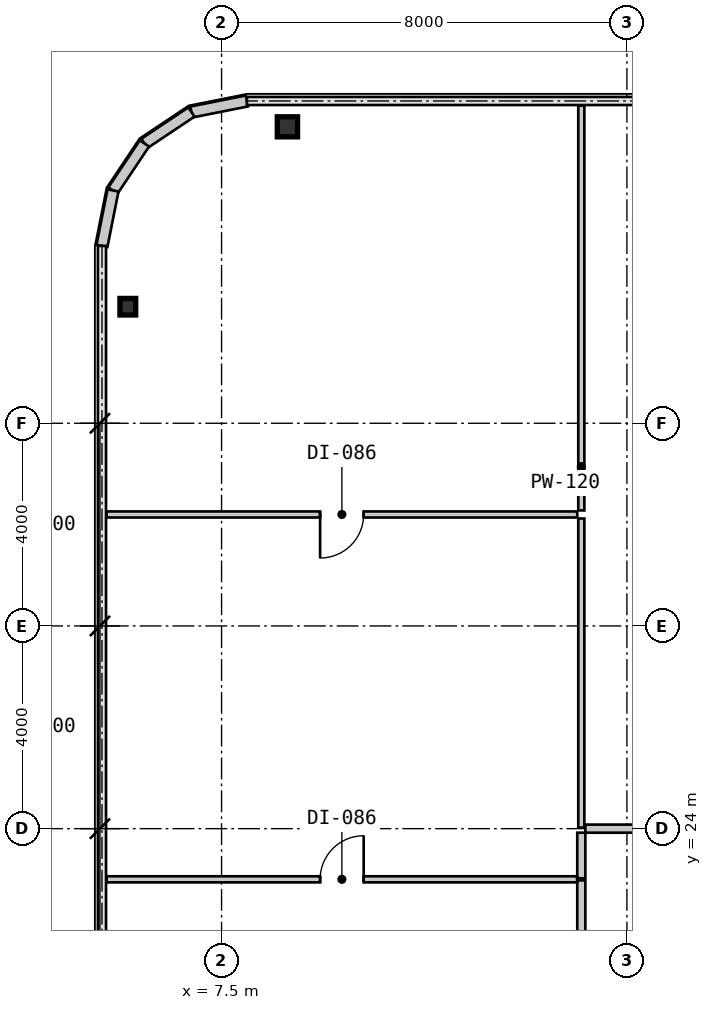
"""IFC4 building model, lengths in metres.
Left out: names, types, materials, properties, quantities, classifications, styles, units other than length and angle.
Written with IfcOpenShell. Run it as: python <this file> out.ifc"""

import sys

from ifc_helpers import new_model, si_unit, direction, frame, frame_2d, origin, origin_2d, place, context, subcontext, project, spatial, rectangle, i_section, extrude, source, transform, mapped, element, fill, save


model = new_model("IFC4")
c1 = context("Model", 3, precision=1e-05, world=origin(), true_north=direction((0.0, 1.0)))
c2 = subcontext(c1, "Body", "Model", "MODEL_VIEW")
j1 = project(units=[si_unit("LENGTHUNIT", "METRE"), si_unit("PLANEANGLEUNIT", "RADIAN")], contexts=[c1])
p1 = place(None, origin())
s1 = spatial("IfcSite", under=j1, at=p1, CompositionType="ELEMENT")
p2 = place(p1, origin())
s2 = spatial("IfcBuilding", under=s1, at=p2, CompositionType="ELEMENT")
p3 = place(p2, frame((0.0, 0.0, 57.75)))
s3 = spatial("IfcBuildingStorey", under=s2, at=p3, CompositionType="ELEMENT", Elevation=57.75)
m1 = source(origin(), c2, "Body", "SweptSolid", [
    extrude(i_section(OverallWidth=0.4, OverallDepth=0.396, WebThickness=0.022, FlangeThickness=0.034, at=origin_2d()), origin(), (0.0, 0.0, 1.0), 3.15),
])
p4 = place(p3, frame((8.8, 37.85, 0.0), z_axis=(0.0, 0.0, 1.0), x_axis=(1.0, 0.0, 0.0)))
e1 = element("IfcColumn", 1, at=p4, inside=s3, PredefinedType="COLUMN", context=c2, shape_type="MappedRepresentation", body=[
    mapped(m1, transform((0.0, 0.0, 0.0), scale=1.0)),
])
m2 = source(origin(), c2, "Body", "SweptSolid", [
    extrude(i_section(OverallWidth=0.311, OverallDepth=0.327, WebThickness=0.016, FlangeThickness=0.025, at=origin_2d()), origin(), (0.0, 0.0, 1.0), 3.15),
])
p5 = place(p3, frame((5.65, 34.3, 0.0), z_axis=(0.0, 0.0, 1.0), x_axis=(1.0, 0.0, 0.0)))
e2 = element("IfcColumn", 2, at=p5, inside=s3, PredefinedType="COLUMN", context=c2, shape_type="MappedRepresentation", body=[
    mapped(m2, transform((0.0, 0.0, 0.0), scale=1.0)),
])
m3 = source(origin(), c2, "Body", "SweptSolid", [
    extrude(rectangle(XDim=1.116, YDim=0.22, at=frame_2d((0.558, 0.0))), origin(), (0.0, 0.0, 1.0), 2.87),
])
for number, where, z_axis, x_axis in (
    (3, (8.0, 38.36, 0.0), (0.0, 0.0, 1.0), (-0.981, -0.195, 0.0)),
    (4, (6.906, 38.142, 0.0), (0.0, 0.0, 1.0), (-0.831, -0.556, 0.0)),
    (5, (5.978, 37.522, 0.0), (0.0, 0.0, 1.0), (-0.556, -0.831, 0.0)),
    (6, (5.358, 36.594, 0.0), (0.0, 0.0, 1.0), (-0.195, -0.981, 0.0)),
):
    element("IfcWall", number, at=place(p3, frame(where, z_axis=z_axis, x_axis=x_axis)), inside=s3, PredefinedType="SOLIDWALL", context=c2, shape_type="MappedRepresentation", body=[
        mapped(m3, transform((0.0, 0.0, 0.0), scale=1.0)),
    ])
m4 = source(origin(), c2, "Body", "SweptSolid", [
    extrude(rectangle(XDim=11.061, YDim=0.16, at=frame_2d((5.531, 0.0))), origin(), (0.0, 0.0, 1.0), 2.87),
])
p6 = place(p3, frame((14.6, 11.918, 0.0), z_axis=(0.0, 0.0, 1.0), x_axis=(0.0, 1.0, 0.0)))
e7 = element("IfcWall", 7, at=p6, inside=s3, PredefinedType="PARTITIONING", context=c2, shape_type="MappedRepresentation", body=[
    mapped(m4, transform((0.0, 0.0, 0.0), scale=1.0)),
])
m5 = source(origin(), c2, "Body", "SweptSolid", [
    extrude(rectangle(XDim=0.92, YDim=2.1, at=frame_2d((0.46, 1.05))), frame((0.0, 0.09, 0.0), z_axis=(0.0, -1.0, 0.0), x_axis=(1.0, 0.0, 0.0)), (0.0, 0.0, 1.0), 0.18),
])
p7 = place(p6, frame((5.071, 0.0, 0.0)))
e8 = element("IfcOpeningElement", 8, at=p7, cuts=e7, PredefinedType="OPENING", context=c2, shape_type="MappedRepresentation", body=[
    mapped(m5, transform((0.0, 0.0, 0.0), scale=1.0)),
])
m6 = source(origin(), c2, "Body", "SweptSolid", [
    extrude(rectangle(XDim=0.9, YDim=0.16, at=frame_2d((0.45, 0.0))), origin(), (0.0, 0.0, 1.0), 2.87),
])
p8 = place(p3, frame((14.6, 23.02, 0.0), z_axis=(0.0, 0.0, 1.0), x_axis=(0.0, 1.0, 0.0)))
e9 = element("IfcWall", 9, at=p8, inside=s3, PredefinedType="PARTITIONING", context=c2, shape_type="MappedRepresentation", body=[
    mapped(m6, transform((0.0, 0.0, 0.0), scale=1.0)),
])
m7 = source(origin(), c2, "Body", "SweptSolid", [
    extrude(rectangle(XDim=4.13, YDim=0.16, at=frame_2d((2.065, 0.0))), origin(), (0.0, 0.0, 1.0), 2.87),
])
p9 = place(p3, frame((14.68, 24.0, 0.0), z_axis=(0.0, 0.0, 1.0), x_axis=(1.0, 0.0, 0.0)))
e10 = element("IfcWall", 10, at=p9, inside=s3, PredefinedType="PARTITIONING", context=c2, shape_type="MappedRepresentation", body=[
    mapped(m7, transform((0.0, 0.0, 0.0), scale=1.0)),
])
p10 = place(p9, frame((1.69, 0.0, 0.0)))
e11 = element("IfcOpeningElement", 11, at=p10, cuts=e10, PredefinedType="OPENING", context=c2, shape_type="MappedRepresentation", body=[
    mapped(m5, transform((0.0, 0.0, 0.0), scale=1.0)),
])
m8 = source(origin(), c2, "Body", "SweptSolid", [
    extrude(rectangle(XDim=9.284, YDim=0.12, at=frame_2d((4.642, 0.0))), origin(), (0.0, 0.0, 1.0), 2.87),
])
p11 = place(p3, frame((5.233, 23.0, 0.0), z_axis=(0.0, 0.0, 1.0), x_axis=(1.0, 0.0, 0.0)))
e12 = element("IfcWall", 12, at=p11, inside=s3, PredefinedType="PARTITIONING", context=c2, shape_type="MappedRepresentation", body=[
    mapped(m8, transform((0.0, 0.0, 0.0), scale=1.0)),
])
m9 = source(origin(), c2, "Body", "SweptSolid", [
    extrude(rectangle(XDim=0.86, YDim=2.1, at=frame_2d((0.43, 1.05))), frame((0.0, 0.07, 0.0), z_axis=(0.0, -1.0, 0.0), x_axis=(1.0, 0.0, 0.0)), (0.0, 0.0, 1.0), 0.14),
])
p12 = place(p11, frame((4.212, 0.0, 0.0)))
e13 = element("IfcOpeningElement", 13, at=p12, cuts=e12, PredefinedType="OPENING", context=c2, shape_type="MappedRepresentation", body=[
    mapped(m9, transform((0.0, 0.0, 0.0), scale=1.0)),
])
m10 = source(origin(), c2, "Body", "SweptSolid", [
    extrude(rectangle(XDim=9.29, YDim=0.12, at=frame_2d((4.645, 0.0))), origin(), (0.0, 0.0, 1.0), 2.87),
])
p13 = place(p3, frame((5.23, 30.2, 0.0), z_axis=(0.0, 0.0, 1.0), x_axis=(1.0, 0.0, 0.0)))
e14 = element("IfcWall", 14, at=p13, inside=s3, PredefinedType="PARTITIONING", context=c2, shape_type="MappedRepresentation", body=[
    mapped(m10, transform((0.0, 0.0, 0.0), scale=1.0)),
])
p14 = place(p13, frame((4.215, 0.0, 0.0)))
e15 = element("IfcOpeningElement", 15, at=p14, cuts=e14, PredefinedType="OPENING", context=c2, shape_type="MappedRepresentation", body=[
    mapped(m9, transform((0.0, 0.0, 0.0), scale=1.0)),
])
m11 = source(origin(), c2, "Body", "SweptSolid", [
    extrude(rectangle(XDim=6.1, YDim=0.12, at=frame_2d((3.05, 0.0))), origin(), (0.0, 0.0, 1.0), 2.87),
])
p15 = place(p3, frame((14.6, 30.12, 0.0), z_axis=(0.0, 0.0, 1.0), x_axis=(0.0, -1.0, 0.0)))
e16 = element("IfcWall", 16, at=p15, inside=s3, PredefinedType="PARTITIONING", context=c2, shape_type="MappedRepresentation", body=[
    mapped(m11, transform((0.0, 0.0, 0.0), scale=1.0)),
])
m12 = source(origin(), c2, "Body", "SweptSolid", [
    extrude(rectangle(XDim=7.99, YDim=0.12, at=frame_2d((3.995, 0.0))), origin(), (0.0, 0.0, 1.0), 2.87),
])
p16 = place(p3, frame((14.6, 38.27, 0.0), z_axis=(0.0, 0.0, 1.0), x_axis=(0.0, -1.0, 0.0)))
e17 = element("IfcWall", 17, at=p16, inside=s3, PredefinedType="PARTITIONING", context=c2, shape_type="MappedRepresentation", body=[
    mapped(m12, transform((0.0, 0.0, 0.0), scale=1.0)),
])
m13 = source(origin(), c2, "Body", "SweptSolid", [
    extrude(rectangle(XDim=0.86, YDim=2.1, at=frame_2d((0.43, 1.05))), frame((0.0, 0.025, 0.0), z_axis=(0.0, -1.0, 0.0), x_axis=(1.0, 0.0, 0.0)), (0.0, 0.0, 1.0), 0.05),
])
p17 = place(p12, origin())
e18 = element("IfcDoor", 18, at=p17, inside=s3, OperationType="SINGLE_SWING_RIGHT", PredefinedType="DOOR", context=c2, shape_type="MappedRepresentation", body=[
    mapped(m13, transform((0.0, 0.0, 0.0), scale=1.0)),
])
fill(e13, e18)
p18 = place(p14, frame((0.86, 0.0, 0.0), z_axis=(0.0, 0.0, 1.0), x_axis=(-1.0, 0.0, 0.0)))
e19 = element("IfcDoor", 19, at=p18, inside=s3, OperationType="SINGLE_SWING_RIGHT", PredefinedType="DOOR", context=c2, shape_type="MappedRepresentation", body=[
    mapped(m13, transform((0.0, 0.0, 0.0), scale=1.0)),
])
fill(e15, e19)
save(model, sys.argv[1])
